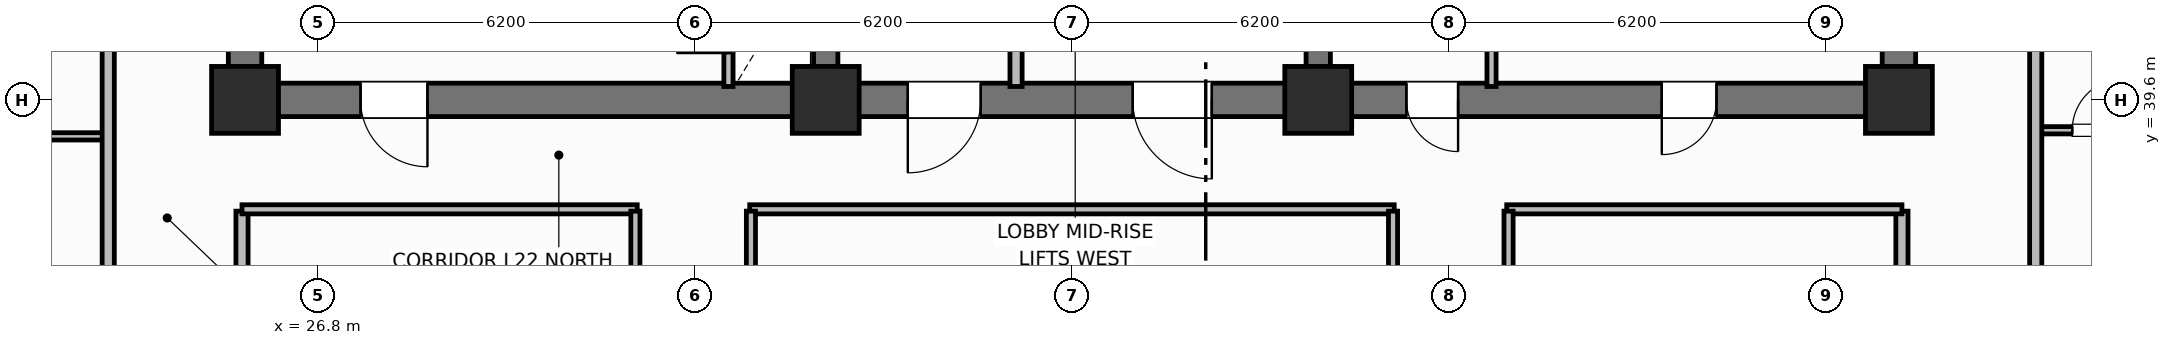
"""IFC4 building model, lengths in metres.
Left out: names, types, materials, properties, quantities, classifications, styles, units other than length and angle.
Written with IfcOpenShell. Run it as: python <this file> out.ifc"""

import sys

from ifc_helpers import new_model, si_unit, direction, frame, frame_2d, origin, origin_2d, place, context, subcontext, project, spatial, rectangle, extrude, element, fill, save


model = new_model("IFC4")
c1 = context("Model", 3, precision=1e-05, world=origin(), true_north=direction((0.0, 1.0)))
c2 = subcontext(c1, "Body", "Model", "MODEL_VIEW")
j1 = project(units=[si_unit("LENGTHUNIT", "METRE"), si_unit("PLANEANGLEUNIT", "RADIAN")], contexts=[c1])
p1 = place(None, origin())
s1 = spatial("IfcSite", under=j1, at=p1, CompositionType="ELEMENT")
p2 = place(p1, origin())
s2 = spatial("IfcBuilding", under=s1, at=p2, CompositionType="ELEMENT")
p3 = place(p2, frame((0.0, 0.0, 92.0)))
s3 = spatial("IfcBuildingStorey", under=s2, at=p3, CompositionType="ELEMENT", Elevation=92.0)
for number, where, z_axis, x_axis in (
    (1, (25.6, 39.875, 0.0), (0.0, 0.0, 1.0), (0.0, 1.0, 0.0)),
    (2, (52.8, 39.875, 0.0), (0.0, 0.0, 1.0), (0.0, 1.0, 0.0)),
):
    element("IfcWall", number, at=place(p3, frame(where, z_axis=z_axis, x_axis=x_axis)), inside=s3, PredefinedType="SHEAR", context=c2, shape_type="SweptSolid", body=[
        extrude(rectangle(XDim=5.65, YDim=0.55, at=frame_2d((2.825, 0.0))), origin(), (0.0, 0.0, 1.0), 3.7),
    ])
p4 = place(p3, frame((52.8, 39.6, 0.0), z_axis=(0.0, 0.0, 1.0), x_axis=(-1.0, 0.0, 0.0)))
e3 = element("IfcWall", 3, at=p4, inside=s3, PredefinedType="SHEAR", context=c2, shape_type="SweptSolid", body=[
    extrude(rectangle(XDim=27.2, YDim=0.55, at=frame_2d((13.6, 0.0))), origin(), (0.0, 0.0, 1.0), 3.7),
])
p5 = place(p4, frame((24.2, 0.0, 0.0)))
e4 = element("IfcOpeningElement", 4, at=p5, cuts=e3, PredefinedType="OPENING", context=c2, shape_type="SweptSolid", body=[
    extrude(rectangle(XDim=1.1, YDim=2.15, at=frame_2d((0.55, 1.075))), frame((0.0, 0.285, 0.0), z_axis=(0.0, -1.0, 0.0), x_axis=(1.0, 0.0, 0.0)), (0.0, 0.0, 1.0), 0.57),
])
p6 = place(p4, frame((15.1, 0.0, 0.0)))
e5 = element("IfcOpeningElement", 5, at=p6, cuts=e3, PredefinedType="OPENING", context=c2, shape_type="SweptSolid", body=[
    extrude(rectangle(XDim=1.2, YDim=2.15, at=frame_2d((0.6, 1.075))), frame((0.0, 0.285, 0.0), z_axis=(0.0, -1.0, 0.0), x_axis=(1.0, 0.0, 0.0)), (0.0, 0.0, 1.0), 0.57),
])
p7 = place(p4, frame((11.3, 0.0, 0.0)))
e6 = element("IfcOpeningElement", 6, at=p7, cuts=e3, PredefinedType="OPENING", context=c2, shape_type="SweptSolid", body=[
    extrude(rectangle(XDim=1.3, YDim=2.2, at=frame_2d((0.65, 1.1))), frame((0.0, 0.285, 0.0), z_axis=(0.0, -1.0, 0.0), x_axis=(1.0, 0.0, 0.0)), (0.0, 0.0, 1.0), 0.57),
])
p8 = place(p4, frame((7.25, 0.0, 0.0)))
e7 = element("IfcOpeningElement", 7, at=p8, cuts=e3, PredefinedType="OPENING", context=c2, shape_type="SweptSolid", body=[
    extrude(rectangle(XDim=0.85, YDim=2.1, at=frame_2d((0.425, 1.05))), frame((0.0, 0.285, 0.0), z_axis=(0.0, -1.0, 0.0), x_axis=(1.0, 0.0, 0.0)), (0.0, 0.0, 1.0), 0.57),
])
p9 = place(p4, frame((3.0, 0.0, 0.0)))
e8 = element("IfcOpeningElement", 8, at=p9, cuts=e3, PredefinedType="OPENING", context=c2, shape_type="SweptSolid", body=[
    extrude(rectangle(XDim=0.9, YDim=2.1, at=frame_2d((0.45, 1.05))), frame((0.0, 0.285, 0.0), z_axis=(0.0, -1.0, 0.0), x_axis=(1.0, 0.0, 0.0)), (0.0, 0.0, 1.0), 0.57),
])
for number, where, z_axis, x_axis in (
    (9, (35.15, 39.875, 0.0), (0.0, 0.0, 1.0), (0.0, 1.0, 0.0)),
    (10, (43.25, 39.875, 0.0), (0.0, 0.0, 1.0), (0.0, 1.0, 0.0)),
):
    element("IfcWall", number, at=place(p3, frame(where, z_axis=z_axis, x_axis=x_axis)), inside=s3, PredefinedType="SHEAR", context=c2, shape_type="SweptSolid", body=[
        extrude(rectangle(XDim=5.65, YDim=0.4, at=frame_2d((2.825, 0.0))), origin(), (0.0, 0.0, 1.0), 3.7),
    ])
for number, where, z_axis, x_axis in (
    (11, (25.6, 39.6, 0.0), (0.0, 0.0, 1.0), (1.0, 0.0, 0.0)),
    (12, (35.15, 39.6, 0.0), (0.0, 0.0, 1.0), (1.0, 0.0, 0.0)),
    (13, (43.25, 39.6, 0.0), (0.0, 0.0, 1.0), (1.0, 0.0, 0.0)),
    (14, (52.8, 39.6, 0.0), (0.0, 0.0, 1.0), (1.0, 0.0, 0.0)),
):
    element("IfcColumn", number, at=place(p3, frame(where, z_axis=z_axis, x_axis=x_axis)), inside=s3, PredefinedType="COLUMN", context=c2, shape_type="SweptSolid", body=[
        extrude(rectangle(XDim=1.1, YDim=1.1, at=origin_2d()), origin(), (0.0, 0.0, 1.0), 3.7),
    ])
p10 = place(p3, frame((33.55, 39.82, 0.0), z_axis=(0.0, 0.0, 1.0), x_axis=(0.0, 1.0, 0.0)))
e15 = element("IfcWall", 15, at=p10, inside=s3, PredefinedType="PARTITIONING", context=c2, shape_type="SweptSolid", body=[
    extrude(rectangle(XDim=2.13, YDim=0.15, at=frame_2d((1.065, 0.0))), origin(), (0.0, 0.0, 1.0), 2.53),
])
p11 = place(p10, frame((0.55, 0.0, 0.0)))
e16 = element("IfcOpeningElement", 16, at=p11, cuts=e15, PredefinedType="OPENING", context=c2, shape_type="SweptSolid", body=[
    extrude(rectangle(XDim=0.85, YDim=2.05, at=frame_2d((0.425, 1.025))), frame((0.0, 0.085, 0.0), z_axis=(0.0, -1.0, 0.0), x_axis=(1.0, 0.0, 0.0)), (0.0, 0.0, 1.0), 0.17),
])
p12 = place(p3, frame((38.28, 39.82, 0.0), z_axis=(0.0, 0.0, 1.0), x_axis=(0.0, 1.0, 0.0)))
e17 = element("IfcWall", 17, at=p12, inside=s3, PredefinedType="PARTITIONING", context=c2, shape_type="SweptSolid", body=[
    extrude(rectangle(XDim=2.73, YDim=0.2, at=frame_2d((1.365, 0.0))), origin(), (0.0, 0.0, 1.0), 2.53),
])
p13 = place(p3, frame((46.1, 39.82, 0.0), z_axis=(0.0, 0.0, 1.0), x_axis=(0.0, 1.0, 0.0)))
e18 = element("IfcWall", 18, at=p13, inside=s3, PredefinedType="PARTITIONING", context=c2, shape_type="SweptSolid", body=[
    extrude(rectangle(XDim=2.73, YDim=0.15, at=frame_2d((1.365, 0.0))), origin(), (0.0, 0.0, 1.0), 2.53),
])
for number, where, z_axis, x_axis in (
    (19, (25.55, 18.63, 0.0), (0.0, 0.0, 1.0), (0.0, 1.0, 0.0)),
    (20, (52.85, 18.63, 0.0), (0.0, 0.0, 1.0), (0.0, 1.0, 0.0)),
):
    element("IfcWall", number, at=place(p3, frame(where, z_axis=z_axis, x_axis=x_axis)), inside=s3, PredefinedType="PARTITIONING", context=c2, shape_type="SweptSolid", body=[
        extrude(rectangle(XDim=19.14, YDim=0.2, at=frame_2d((9.57, 0.0))), origin(), (0.0, 0.0, 1.0), 2.53),
    ])
p14 = place(p3, frame((25.55, 37.8, 0.0), z_axis=(0.0, 0.0, 1.0), x_axis=(1.0, 0.0, 0.0)))
e21 = element("IfcWall", 21, at=p14, inside=s3, PredefinedType="PARTITIONING", context=c2, shape_type="SweptSolid", body=[
    extrude(rectangle(XDim=6.5, YDim=0.15, at=frame_2d((3.25, 0.0))), origin(), (0.0, 0.0, 1.0), 2.53),
])
p15 = place(p3, frame((33.9, 37.8, 0.0), z_axis=(0.0, 0.0, 1.0), x_axis=(1.0, 0.0, 0.0)))
e22 = element("IfcWall", 22, at=p15, inside=s3, PredefinedType="PARTITIONING", context=c2, shape_type="SweptSolid", body=[
    extrude(rectangle(XDim=10.6, YDim=0.15, at=frame_2d((5.3, 0.0))), origin(), (0.0, 0.0, 1.0), 2.53),
])
p16 = place(p3, frame((46.35, 37.8, 0.0), z_axis=(0.0, 0.0, 1.0), x_axis=(1.0, 0.0, 0.0)))
e23 = element("IfcWall", 23, at=p16, inside=s3, PredefinedType="PARTITIONING", context=c2, shape_type="SweptSolid", body=[
    extrude(rectangle(XDim=6.5, YDim=0.15, at=frame_2d((3.25, 0.0))), origin(), (0.0, 0.0, 1.0), 2.53),
])
p17 = place(p3, frame((32.02, 18.63, 0.0), z_axis=(0.0, 0.0, 1.0), x_axis=(0.0, 1.0, 0.0)))
e24 = element("IfcWall", 24, at=p17, inside=s3, PredefinedType="PARTITIONING", context=c2, shape_type="SweptSolid", body=[
    extrude(rectangle(XDim=19.14, YDim=0.15, at=frame_2d((9.57, 0.0))), origin(), (0.0, 0.0, 1.0), 2.53),
])
p18 = place(p17, frame((3.0, 0.0, 0.0)))
e25 = element("IfcOpeningElement", 25, at=p18, cuts=e24, PredefinedType="OPENING", context=c2, shape_type="SweptSolid", body=[
    extrude(rectangle(XDim=0.9, YDim=2.1, at=frame_2d((0.45, 1.05))), frame((0.0, 0.085, 0.0), z_axis=(0.0, -1.0, 0.0), x_axis=(1.0, 0.0, 0.0)), (0.0, 0.0, 1.0), 0.17),
])
p19 = place(p17, frame((11.5, 0.0, 0.0)))
e26 = element("IfcOpeningElement", 26, at=p19, cuts=e24, PredefinedType="OPENING", context=c2, shape_type="SweptSolid", body=[
    extrude(rectangle(XDim=0.9, YDim=2.1, at=frame_2d((0.45, 1.05))), frame((0.0, 0.085, 0.0), z_axis=(0.0, -1.0, 0.0), x_axis=(1.0, 0.0, 0.0)), (0.0, 0.0, 1.0), 0.17),
])
p20 = place(p3, frame((33.92, 18.63, 0.0), z_axis=(0.0, 0.0, 1.0), x_axis=(0.0, 1.0, 0.0)))
e27 = element("IfcWall", 27, at=p20, inside=s3, PredefinedType="PARTITIONING", context=c2, shape_type="SweptSolid", body=[
    extrude(rectangle(XDim=19.14, YDim=0.15, at=frame_2d((9.57, 0.0))), origin(), (0.0, 0.0, 1.0), 2.53),
])
p21 = place(p20, frame((2.4, 0.0, 0.0)))
e28 = element("IfcOpeningElement", 28, at=p21, cuts=e27, PredefinedType="OPENING", context=c2, shape_type="SweptSolid", body=[
    extrude(rectangle(XDim=0.9, YDim=2.1, at=frame_2d((0.45, 1.05))), frame((0.0, 0.085, 0.0), z_axis=(0.0, -1.0, 0.0), x_axis=(1.0, 0.0, 0.0)), (0.0, 0.0, 1.0), 0.17),
])
p22 = place(p3, frame((44.48, 18.63, 0.0), z_axis=(0.0, 0.0, 1.0), x_axis=(0.0, 1.0, 0.0)))
e29 = element("IfcWall", 29, at=p22, inside=s3, PredefinedType="PARTITIONING", context=c2, shape_type="SweptSolid", body=[
    extrude(rectangle(XDim=19.14, YDim=0.15, at=frame_2d((9.57, 0.0))), origin(), (0.0, 0.0, 1.0), 2.53),
])
p23 = place(p22, frame((8.89, 0.0, 0.0)))
e30 = element("IfcOpeningElement", 30, at=p23, cuts=e29, PredefinedType="OPENING", context=c2, shape_type="SweptSolid", body=[
    extrude(rectangle(XDim=0.9, YDim=2.1, at=frame_2d((0.45, 1.05))), frame((0.0, 0.085, 0.0), z_axis=(0.0, -1.0, 0.0), x_axis=(1.0, 0.0, 0.0)), (0.0, 0.0, 1.0), 0.17),
])
p24 = place(p3, frame((46.38, 18.63, 0.0), z_axis=(0.0, 0.0, 1.0), x_axis=(0.0, 1.0, 0.0)))
e31 = element("IfcWall", 31, at=p24, inside=s3, PredefinedType="PARTITIONING", context=c2, shape_type="SweptSolid", body=[
    extrude(rectangle(XDim=19.14, YDim=0.15, at=frame_2d((9.57, 0.0))), origin(), (0.0, 0.0, 1.0), 2.53),
])
p25 = place(p24, frame((5.5, 0.0, 0.0)))
e32 = element("IfcOpeningElement", 32, at=p25, cuts=e31, PredefinedType="OPENING", context=c2, shape_type="SweptSolid", body=[
    extrude(rectangle(XDim=1.0, YDim=2.15, at=frame_2d((0.5, 1.075))), frame((0.0, 0.085, 0.0), z_axis=(0.0, -1.0, 0.0), x_axis=(1.0, 0.0, 0.0)), (0.0, 0.0, 1.0), 0.17),
])
p26 = place(p3, frame((21.1, 39.0, 0.0), z_axis=(0.0, 0.0, 1.0), x_axis=(1.0, 0.0, 0.0)))
e33 = element("IfcWall", 33, at=p26, inside=s3, PredefinedType="PARTITIONING", context=c2, shape_type="SweptSolid", body=[
    extrude(rectangle(XDim=2.25, YDim=0.12, at=frame_2d((1.125, 0.0))), origin(), (0.0, 0.0, 1.0), 2.53),
])
p27 = place(p3, frame((23.35, 10.6, 0.0), z_axis=(0.0, 0.0, 1.0), x_axis=(0.0, 1.0, 0.0)))
e34 = element("IfcWall", 34, at=p27, inside=s3, PredefinedType="PARTITIONING", context=c2, shape_type="SweptSolid", body=[
    extrude(rectangle(XDim=35.2, YDim=0.2, at=frame_2d((17.6, 0.0))), origin(), (0.0, 0.0, 1.0), 2.53),
])
p28 = place(p27, frame((2.65, 0.0, 0.0)))
e35 = element("IfcOpeningElement", 35, at=p28, cuts=e34, PredefinedType="OPENING", context=c2, shape_type="SweptSolid", body=[
    extrude(rectangle(XDim=1.0, YDim=2.15, at=frame_2d((0.5, 1.075))), frame((0.0, 0.11, 0.0), z_axis=(0.0, -1.0, 0.0), x_axis=(1.0, 0.0, 0.0)), (0.0, 0.0, 1.0), 0.22),
])
p29 = place(p27, frame((22.75, 0.0, 0.0)))
e36 = element("IfcOpeningElement", 36, at=p29, cuts=e34, PredefinedType="OPENING", context=c2, shape_type="SweptSolid", body=[
    extrude(rectangle(XDim=1.0, YDim=2.15, at=frame_2d((0.5, 1.075))), frame((0.0, 0.11, 0.0), z_axis=(0.0, -1.0, 0.0), x_axis=(1.0, 0.0, 0.0)), (0.0, 0.0, 1.0), 0.22),
])
p30 = place(p3, frame((55.05, 39.1, 0.0), z_axis=(0.0, 0.0, 1.0), x_axis=(1.0, 0.0, 0.0)))
e37 = element("IfcWall", 37, at=p30, inside=s3, PredefinedType="PARTITIONING", context=c2, shape_type="SweptSolid", body=[
    extrude(rectangle(XDim=2.25, YDim=0.12, at=frame_2d((1.125, 0.0))), origin(), (0.0, 0.0, 1.0), 2.53),
])
p31 = place(p30, frame((0.6, 0.0, 0.0)))
e38 = element("IfcOpeningElement", 38, at=p31, cuts=e37, PredefinedType="OPENING", context=c2, shape_type="SweptSolid", body=[
    extrude(rectangle(XDim=0.85, YDim=2.1, at=frame_2d((0.425, 1.05))), frame((0.0, 0.07, 0.0), z_axis=(0.0, -1.0, 0.0), x_axis=(1.0, 0.0, 0.0)), (0.0, 0.0, 1.0), 0.14),
])
p32 = place(p3, frame((55.05, 10.6, 0.0), z_axis=(0.0, 0.0, 1.0), x_axis=(0.0, 1.0, 0.0)))
e39 = element("IfcWall", 39, at=p32, inside=s3, PredefinedType="PARTITIONING", context=c2, shape_type="SweptSolid", body=[
    extrude(rectangle(XDim=35.2, YDim=0.2, at=frame_2d((17.6, 0.0))), origin(), (0.0, 0.0, 1.0), 2.53),
])
p33 = place(p32, frame((2.65, 0.0, 0.0)))
e40 = element("IfcOpeningElement", 40, at=p33, cuts=e39, PredefinedType="OPENING", context=c2, shape_type="SweptSolid", body=[
    extrude(rectangle(XDim=1.0, YDim=2.15, at=frame_2d((0.5, 1.075))), frame((0.0, 0.11, 0.0), z_axis=(0.0, -1.0, 0.0), x_axis=(1.0, 0.0, 0.0)), (0.0, 0.0, 1.0), 0.22),
])
p34 = place(p32, frame((11.814, 0.0, 0.0)))
e41 = element("IfcOpeningElement", 41, at=p34, cuts=e39, PredefinedType="OPENING", context=c2, shape_type="SweptSolid", body=[
    extrude(rectangle(XDim=1.0, YDim=2.15, at=frame_2d((0.5, 1.075))), frame((0.0, 0.11, 0.0), z_axis=(0.0, -1.0, 0.0), x_axis=(1.0, 0.0, 0.0)), (0.0, 0.0, 1.0), 0.22),
])
p35 = place(p32, frame((23.65, 0.0, 0.0)))
e42 = element("IfcOpeningElement", 42, at=p35, cuts=e39, PredefinedType="OPENING", context=c2, shape_type="SweptSolid", body=[
    extrude(rectangle(XDim=1.0, YDim=2.15, at=frame_2d((0.5, 1.075))), frame((0.0, 0.11, 0.0), z_axis=(0.0, -1.0, 0.0), x_axis=(1.0, 0.0, 0.0)), (0.0, 0.0, 1.0), 0.22),
])
p36 = place(p11, origin())
e43 = element("IfcDoor", 43, at=p36, inside=s3, OperationType="SINGLE_SWING_LEFT", PredefinedType="TRAPDOOR", context=c2, shape_type="SweptSolid", body=[
    extrude(rectangle(XDim=0.85, YDim=2.05, at=frame_2d((0.425, 1.025))), frame((0.0, 0.025, 0.0), z_axis=(0.0, -1.0, 0.0), x_axis=(1.0, 0.0, 0.0)), (0.0, 0.0, 1.0), 0.05),
])
fill(e16, e43)
p37 = place(p31, origin())
e44 = element("IfcDoor", 44, at=p37, inside=s3, OperationType="SINGLE_SWING_RIGHT", PredefinedType="DOOR", context=c2, shape_type="SweptSolid", body=[
    extrude(rectangle(XDim=0.85, YDim=2.1, at=frame_2d((0.425, 1.05))), frame((0.0, 0.025, 0.0), z_axis=(0.0, -1.0, 0.0), x_axis=(1.0, 0.0, 0.0)), (0.0, 0.0, 1.0), 0.05),
])
fill(e38, e44)
p38 = place(p5, origin())
e45 = element("IfcDoor", 45, at=p38, inside=s3, OperationType="SINGLE_SWING_LEFT", PredefinedType="DOOR", context=c2, shape_type="SweptSolid", body=[
    extrude(rectangle(XDim=1.1, YDim=2.15, at=frame_2d((0.55, 1.075))), frame((0.0, 0.025, 0.0), z_axis=(0.0, -1.0, 0.0), x_axis=(1.0, 0.0, 0.0)), (0.0, 0.0, 1.0), 0.05),
])
fill(e4, e45)
p39 = place(p6, origin())
e46 = element("IfcDoor", 46, at=p39, inside=s3, OperationType="SINGLE_SWING_RIGHT", PredefinedType="DOOR", context=c2, shape_type="SweptSolid", body=[
    extrude(rectangle(XDim=1.2, YDim=2.15, at=frame_2d((0.6, 1.075))), frame((0.0, 0.025, 0.0), z_axis=(0.0, -1.0, 0.0), x_axis=(1.0, 0.0, 0.0)), (0.0, 0.0, 1.0), 0.05),
])
fill(e5, e46)
p40 = place(p7, origin())
e47 = element("IfcDoor", 47, at=p40, inside=s3, OperationType="SINGLE_SWING_LEFT", PredefinedType="DOOR", context=c2, shape_type="SweptSolid", body=[
    extrude(rectangle(XDim=1.3, YDim=2.2, at=frame_2d((0.65, 1.1))), frame((0.0, 0.025, 0.0), z_axis=(0.0, -1.0, 0.0), x_axis=(1.0, 0.0, 0.0)), (0.0, 0.0, 1.0), 0.05),
])
fill(e6, e47)
p41 = place(p8, origin())
e48 = element("IfcDoor", 48, at=p41, inside=s3, OperationType="SINGLE_SWING_LEFT", PredefinedType="DOOR", context=c2, shape_type="SweptSolid", body=[
    extrude(rectangle(XDim=0.85, YDim=2.1, at=frame_2d((0.425, 1.05))), frame((0.0, 0.025, 0.0), z_axis=(0.0, -1.0, 0.0), x_axis=(1.0, 0.0, 0.0)), (0.0, 0.0, 1.0), 0.05),
])
fill(e7, e48)
p42 = place(p9, origin())
e49 = element("IfcDoor", 49, at=p42, inside=s3, OperationType="SINGLE_SWING_RIGHT", PredefinedType="DOOR", context=c2, shape_type="SweptSolid", body=[
    extrude(rectangle(XDim=0.9, YDim=2.1, at=frame_2d((0.45, 1.05))), frame((0.0, 0.025, 0.0), z_axis=(0.0, -1.0, 0.0), x_axis=(1.0, 0.0, 0.0)), (0.0, 0.0, 1.0), 0.05),
])
fill(e8, e49)
save(model, sys.argv[1])
